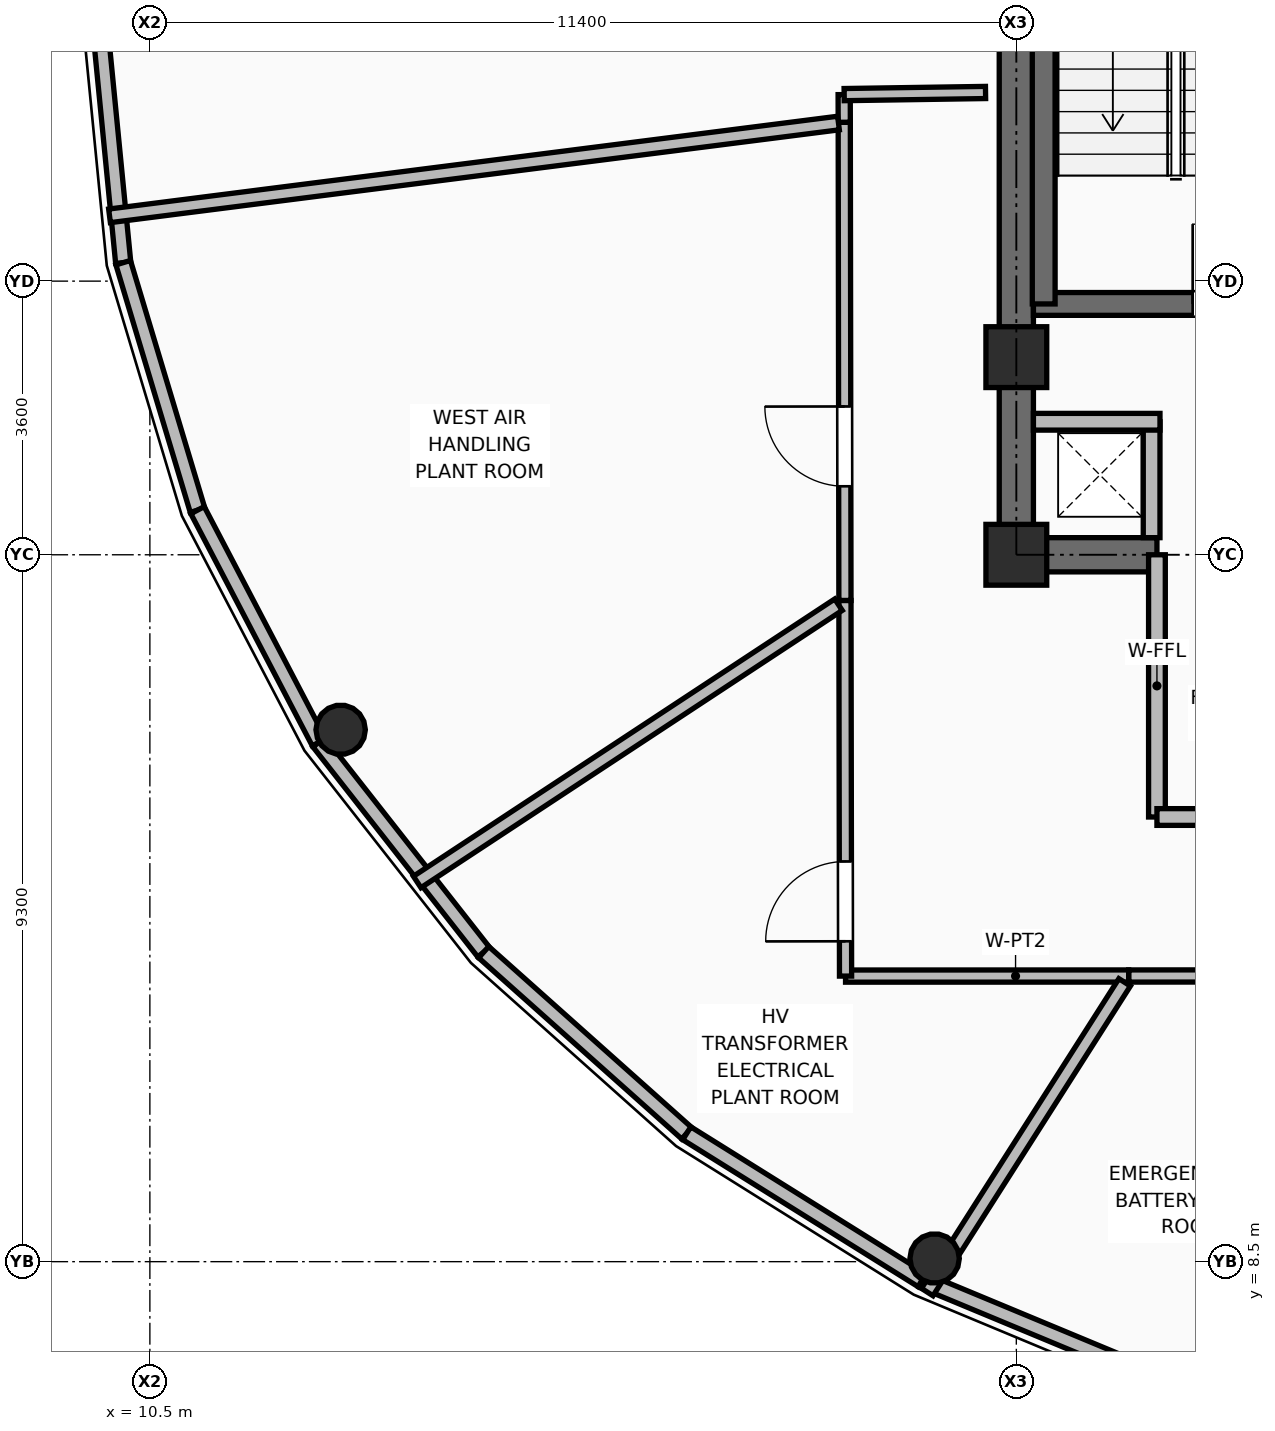
"""IFC4 building model, lengths in metres.
Left out: names, types, materials, properties, quantities, classifications, styles, units other than length and angle.
Written with IfcOpenShell. Run it as: python <this file> out.ifc"""

import sys

from ifc_helpers import new_model, si_unit, direction, frame, frame_2d, origin, origin_2d, place, context, subcontext, project, spatial, rectangle, hollow_circle, extrude, element, fill, save


model = new_model("IFC4")
c1 = context("Model", 3, precision=1e-05, world=origin(), true_north=direction((0.0, 1.0)))
c2 = subcontext(c1, "Body", "Model", "MODEL_VIEW")
j1 = project(units=[si_unit("LENGTHUNIT", "METRE"), si_unit("PLANEANGLEUNIT", "RADIAN")], contexts=[c1])
p1 = place(None, origin())
s1 = spatial("IfcSite", under=j1, at=p1, CompositionType="ELEMENT")
p2 = place(p1, origin())
s2 = spatial("IfcBuilding", under=s1, at=p2, CompositionType="ELEMENT")
p3 = place(p2, frame((0.0, 0.0, 253.65)))
s3 = spatial("IfcBuildingStorey", under=s2, at=p3, CompositionType="ELEMENT", Elevation=253.65)
for number, where, z_axis, x_axis in (
    (1, (21.9, 17.8, 0.0), (0.0, 0.0, 1.0), (1.0, 0.0, 0.0)),
    (2, (21.9, 20.4, 0.0), (0.0, 0.0, 1.0), (1.0, 0.0, 0.0)),
):
    element("IfcColumn", number, at=place(p3, frame(where, z_axis=z_axis, x_axis=x_axis)), inside=s3, PredefinedType="COLUMN", context=c2, shape_type="SweptSolid", body=[
        extrude(rectangle(XDim=0.8, YDim=0.8, at=origin_2d()), origin(), (0.0, 0.0, 1.0), 5.4),
    ])
p4 = place(p3, frame((13.01, 15.498, 0.0), z_axis=(0.224793032222, 0.115835378923, 0.967496903175), x_axis=(-0.458059425605, 0.888921572814, 0.0)))
e3 = element("IfcColumn", 3, at=p4, inside=s3, PredefinedType="COLUMN", context=c2, shape_type="SweptSolid", body=[
    extrude(hollow_circle(Radius=0.325, WallThickness=0.03, at=origin_2d()), origin(), (0.0, 0.0, 1.0), 5.396),
])
p5 = place(p3, frame((20.825, 8.542, 0.0), z_axis=(0.130171994019, 0.201410172818, 0.970818826691), x_axis=(-0.839859571413, 0.542803740136, 0.0)))
e4 = element("IfcColumn", 4, at=p5, inside=s3, PredefinedType="COLUMN", context=c2, shape_type="SweptSolid", body=[
    extrude(hollow_circle(Radius=0.325, WallThickness=0.03, at=origin_2d()), origin(), (0.0, 0.0, 1.0), 5.377),
])
p6 = place(p3, frame((9.82, 25.0, 0.0), z_axis=(0.0, 0.0, 1.0), x_axis=(0.097496920609, -0.995235826562, 0.0)))
e5 = element("IfcWall", 5, at=p6, inside=s3, PredefinedType="PARAPET", context=c2, shape_type="SweptSolid", body=[
    extrude(rectangle(XDim=3.373, YDim=0.2, at=frame_2d((1.687, 0.0))), origin(), (0.0, 0.0, 1.0), 1.12),
])
p7 = place(p3, frame((10.149, 21.643, 0.0), z_axis=(0.0, 0.0, 1.0), x_axis=(0.287670684646, -0.957729386202, 0.0)))
e6 = element("IfcWall", 6, at=p7, inside=s3, PredefinedType="PARAPET", context=c2, shape_type="SweptSolid", body=[
    extrude(rectangle(XDim=3.4, YDim=0.2, at=frame_2d((1.7, 0.0))), origin(), (0.0, 0.0, 1.0), 1.12),
])
p8 = place(p3, frame((11.127, 18.387, 0.0), z_axis=(0.0, 0.0, 1.0), x_axis=(0.463654949237, -0.886015850901, 0.0)))
e7 = element("IfcWall", 7, at=p8, inside=s3, PredefinedType="PARAPET", context=c2, shape_type="SweptSolid", body=[
    extrude(rectangle(XDim=3.447, YDim=0.2, at=frame_2d((1.723, 0.0))), origin(), (0.0, 0.0, 1.0), 1.12),
])
p9 = place(p3, frame((12.725, 15.333, 0.0), z_axis=(0.0, 0.0, 1.0), x_axis=(0.617406744437, -0.786644082113, 0.0)))
e8 = element("IfcWall", 8, at=p9, inside=s3, PredefinedType="PARAPET", context=c2, shape_type="SweptSolid", body=[
    extrude(rectangle(XDim=3.51, YDim=0.2, at=frame_2d((1.755, 0.0))), origin(), (0.0, 0.0, 1.0), 1.12),
])
p10 = place(p3, frame((14.892, 12.572, 0.0), z_axis=(0.0, 0.0, 1.0), x_axis=(0.74629085689, -0.665619979359, 0.0)))
e9 = element("IfcWall", 9, at=p10, inside=s3, PredefinedType="PARAPET", context=c2, shape_type="SweptSolid", body=[
    extrude(rectangle(XDim=3.58, YDim=0.2, at=frame_2d((1.79, 0.0))), origin(), (0.0, 0.0, 1.0), 1.12),
])
p11 = place(p3, frame((17.564, 10.189, 0.0), z_axis=(0.0, 0.0, 1.0), x_axis=(0.84825750298, -0.529583995828, 0.0)))
e10 = element("IfcWall", 10, at=p11, inside=s3, PredefinedType="PARAPET", context=c2, shape_type="SweptSolid", body=[
    extrude(rectangle(XDim=3.65, YDim=0.2, at=frame_2d((1.825, 0.0))), origin(), (0.0, 0.0, 1.0), 1.12),
])
p12 = place(p3, frame((20.66, 8.256, 0.0), z_axis=(0.0, 0.0, 1.0), x_axis=(0.92336680677, -0.383918923935, 0.0)))
e11 = element("IfcWall", 11, at=p12, inside=s3, PredefinedType="PARAPET", context=c2, shape_type="SweptSolid", body=[
    extrude(rectangle(XDim=3.709, YDim=0.2, at=frame_2d((1.854, 0.0))), origin(), (0.0, 0.0, 1.0), 1.12),
])
p13 = place(p3, frame((21.675, 17.8, 0.0), z_axis=(0.0, 0.0, 1.0), x_axis=(1.0, 0.0, 0.0)))
e12 = element("IfcWall", 12, at=p13, inside=s3, PredefinedType="SHEAR", context=c2, shape_type="SweptSolid", body=[
    extrude(rectangle(XDim=2.075, YDim=0.45, at=frame_2d((1.038, 0.0))), origin(), (0.0, 0.0, 1.0), 5.22),
])
p14 = place(p3, frame((21.9, 18.025, 0.0), z_axis=(0.0, 0.0, 1.0), x_axis=(0.0, 1.0, 0.0)))
e13 = element("IfcWall", 13, at=p14, inside=s3, PredefinedType="SHEAR", context=c2, shape_type="SweptSolid", body=[
    extrude(rectangle(XDim=14.2, YDim=0.45, at=frame_2d((7.1, 0.0))), origin(), (0.0, 0.0, 1.0), 5.22),
])
p15 = place(p3, frame((22.125, 21.1, 0.0), z_axis=(0.0, 0.0, 1.0), x_axis=(1.0, 0.0, 0.0)))
e14 = element("IfcWall", 14, at=p15, inside=s3, PredefinedType="SHEAR", context=c2, shape_type="SweptSolid", body=[
    extrude(rectangle(XDim=3.615, YDim=0.3, at=frame_2d((1.808, 0.0))), origin(), (0.0, 0.0, 1.0), 5.22),
])
p16 = place(p15, frame((2.095, 0.0, 0.0)))
e15 = element("IfcOpeningElement", 15, at=p16, cuts=e14, PredefinedType="OPENING", context=c2, shape_type="SweptSolid", body=[
    extrude(rectangle(XDim=1.05, YDim=2.1, at=frame_2d((0.525, 1.05))), frame((0.0, 0.16, 0.0), z_axis=(0.0, -1.0, 0.0), x_axis=(1.0, 0.0, 0.0)), (0.0, 0.0, 1.0), 0.32),
])
p17 = place(p3, frame((22.26, 21.1, 0.0), z_axis=(0.0, 0.0, 1.0), x_axis=(0.0, 1.0, 0.0)))
e16 = element("IfcWall", 16, at=p17, inside=s3, PredefinedType="SHEAR", context=c2, shape_type="SweptSolid", body=[
    extrude(rectangle(XDim=7.75, YDim=0.3, at=frame_2d((3.875, 0.0))), origin(), (0.0, 0.0, 1.0), 5.22),
])
p18 = place(p3, frame((23.68, 18.025, 0.0), z_axis=(0.0, 0.0, 1.0), x_axis=(0.0, 1.0, 0.0)))
e17 = element("IfcWall", 17, at=p18, inside=s3, PredefinedType="PARTITIONING", context=c2, shape_type="SweptSolid", body=[
    extrude(rectangle(XDim=1.525, YDim=0.22, at=frame_2d((0.763, 0.0))), origin(), (0.0, 0.0, 1.0), 5.2),
])
p19 = place(p3, frame((22.125, 19.55, 0.0), z_axis=(0.0, 0.0, 1.0), x_axis=(1.0, 0.0, 0.0)))
e18 = element("IfcWall", 18, at=p19, inside=s3, PredefinedType="PARTITIONING", context=c2, shape_type="SweptSolid", body=[
    extrude(rectangle(XDim=1.665, YDim=0.22, at=frame_2d((0.833, 0.0))), origin(), (0.0, 0.0, 1.0), 4.245),
])
p20 = place(p3, frame((23.75, 14.35, 0.0), z_axis=(0.0, 0.0, 1.0), x_axis=(0.0, 1.0, 0.0)))
e19 = element("IfcWall", 19, at=p20, inside=s3, PredefinedType="PARTITIONING", context=c2, shape_type="SweptSolid", body=[
    extrude(rectangle(XDim=3.45, YDim=0.22, at=frame_2d((1.725, 0.0))), origin(), (0.0, 0.0, 1.0), 4.733),
])
p21 = place(p3, frame((23.75, 14.35, 0.0), z_axis=(0.0, 0.0, 1.0), x_axis=(1.0, 0.0, 0.0)))
e20 = element("IfcWall", 20, at=p21, inside=s3, PredefinedType="PARTITIONING", context=c2, shape_type="SweptSolid", body=[
    extrude(rectangle(XDim=3.8, YDim=0.22, at=frame_2d((1.9, 0.0))), origin(), (0.0, 0.0, 1.0), 5.2),
])
p22 = place(p3, frame((28.511, 12.261, 0.0), z_axis=(0.0, 0.0, 1.0), x_axis=(-0.999999837123, -0.000570749015, 0.0)))
e21 = element("IfcWall", 21, at=p22, inside=s3, PredefinedType="PARTITIONING", context=c2, shape_type="SweptSolid", body=[
    extrude(rectangle(XDim=5.133, YDim=0.16, at=frame_2d((2.566, 0.0))), origin(), (0.0, 0.0, 1.0), 5.2),
])
p23 = place(p22, frame((2.042, 0.0, 0.0)))
e22 = element("IfcOpeningElement", 22, at=p23, cuts=e21, PredefinedType="OPENING", context=c2, shape_type="SweptSolid", body=[
    extrude(rectangle(XDim=1.05, YDim=2.1, at=frame_2d((0.525, 1.05))), frame((0.0, 0.09, 0.0), z_axis=(0.0, -1.0, 0.0), x_axis=(1.0, 0.0, 0.0)), (0.0, 0.0, 1.0), 0.18),
])
p24 = place(p3, frame((23.378, 12.258, 0.0), z_axis=(0.0, 0.0, 1.0), x_axis=(-0.999999965632, -0.00026217473, 0.0)))
e23 = element("IfcWall", 23, at=p24, inside=s3, PredefinedType="PARTITIONING", context=c2, shape_type="SweptSolid", body=[
    extrude(rectangle(XDim=3.725, YDim=0.16, at=frame_2d((1.862, 0.0))), origin(), (0.0, 0.0, 1.0), 4.733),
])
p25 = place(p3, frame((19.653, 12.257, 0.0), z_axis=(0.0, 0.0, 1.0), x_axis=(-0.001630271522, 0.999998671106, 0.0)))
e24 = element("IfcWall", 24, at=p25, inside=s3, PredefinedType="PARTITIONING", context=c2, shape_type="SweptSolid", body=[
    extrude(rectangle(XDim=4.942, YDim=0.16, at=frame_2d((2.471, 0.0))), origin(), (0.0, 0.0, 1.0), 4.733),
])
p26 = place(p25, frame((0.458, 0.0, 0.0)))
e25 = element("IfcOpeningElement", 25, at=p26, cuts=e24, PredefinedType="OPENING", context=c2, shape_type="SweptSolid", body=[
    extrude(rectangle(XDim=1.05, YDim=2.1, at=frame_2d((0.525, 1.05))), frame((0.0, 0.09, 0.0), z_axis=(0.0, -1.0, 0.0), x_axis=(1.0, 0.0, 0.0)), (0.0, 0.0, 1.0), 0.18),
])
p27 = place(p3, frame((19.645, 17.199, 0.0), z_axis=(0.0, 0.0, 1.0), x_axis=(-0.001435887995, 0.999998969112, 0.0)))
e26 = element("IfcWall", 26, at=p27, inside=s3, PredefinedType="PARTITIONING", context=c2, shape_type="SweptSolid", body=[
    extrude(rectangle(XDim=6.291, YDim=0.16, at=frame_2d((3.146, 0.0))), origin(), (0.0, 0.0, 1.0), 4.733),
])
p28 = place(p27, frame((1.502, 0.0, 0.0)))
e27 = element("IfcOpeningElement", 27, at=p28, cuts=e26, PredefinedType="OPENING", context=c2, shape_type="SweptSolid", body=[
    extrude(rectangle(XDim=1.05, YDim=2.1, at=frame_2d((0.525, 1.05))), frame((0.0, 0.09, 0.0), z_axis=(0.0, -1.0, 0.0), x_axis=(1.0, 0.0, 0.0)), (0.0, 0.0, 1.0), 0.18),
])
p29 = place(p3, frame((19.636, 23.49, 0.0), z_axis=(0.0, 0.0, 1.0), x_axis=(-0.002682753592, 0.99999640141, 0.0)))
e28 = element("IfcWall", 28, at=p29, inside=s3, PredefinedType="PARTITIONING", context=c2, shape_type="SweptSolid", body=[
    extrude(rectangle(XDim=0.364, YDim=0.16, at=frame_2d((0.182, 0.0))), origin(), (0.0, 0.0, 1.0), 5.2),
])
p30 = place(p3, frame((19.635, 23.854, 0.0), z_axis=(0.0, 0.0, 1.0), x_axis=(0.999886107392, 0.015092125259, 0.0)))
e29 = element("IfcWall", 29, at=p30, inside=s3, PredefinedType="PARTITIONING", context=c2, shape_type="SweptSolid", body=[
    extrude(rectangle(XDim=1.86, YDim=0.16, at=frame_2d((0.93, 0.0))), origin(), (0.0, 0.0, 1.0), 4.245),
])
p31 = place(p3, frame((19.56, 23.48, 0.0), z_axis=(0.0, 0.0, 1.0), x_axis=(-0.991994461283, -0.12628138732, 0.0)))
e30 = element("IfcWall", 30, at=p31, inside=s3, PredefinedType="PARTITIONING", context=c2, shape_type="SweptSolid", body=[
    extrude(rectangle(XDim=9.668, YDim=0.18, at=frame_2d((4.834, 0.0))), origin(), (0.0, 0.0, 1.0), 4.575),
])
p32 = place(p3, frame((19.56, 17.143, 0.0), z_axis=(0.0, 0.0, 1.0), x_axis=(-0.835329937022, -0.549748939349, 0.0)))
e31 = element("IfcWall", 31, at=p32, inside=s3, PredefinedType="PARTITIONING", context=c2, shape_type="SweptSolid", body=[
    extrude(rectangle(XDim=6.636, YDim=0.18, at=frame_2d((3.318, 0.0))), origin(), (0.0, 0.0, 1.0), 4.575),
])
p33 = place(p3, frame((23.325, 12.175, 0.0), z_axis=(0.0, 0.0, 1.0), x_axis=(-0.537431147311, -0.843307631829, 0.0)))
e32 = element("IfcWall", 32, at=p33, inside=s3, PredefinedType="PARTITIONING", context=c2, shape_type="SweptSolid", body=[
    extrude(rectangle(XDim=4.832, YDim=0.18, at=frame_2d((2.416, 0.0))), origin(), (0.0, 0.0, 1.0), 4.575),
])
p34 = place(p16, origin())
e33 = element("IfcDoor", 33, at=p34, inside=s3, OperationType="SINGLE_SWING_LEFT", PredefinedType="DOOR", context=c2, shape_type="SweptSolid", body=[
    extrude(rectangle(XDim=1.05, YDim=2.1, at=frame_2d((0.525, 1.05))), frame((0.0, 0.025, 0.0), z_axis=(0.0, -1.0, 0.0), x_axis=(1.0, 0.0, 0.0)), (0.0, 0.0, 1.0), 0.05),
])
fill(e15, e33)
p35 = place(p28, origin())
e34 = element("IfcDoor", 34, at=p35, inside=s3, OperationType="SINGLE_SWING_RIGHT", PredefinedType="DOOR", context=c2, shape_type="SweptSolid", body=[
    extrude(rectangle(XDim=1.05, YDim=2.1, at=frame_2d((0.525, 1.05))), frame((0.0, 0.025, 0.0), z_axis=(0.0, -1.0, 0.0), x_axis=(1.0, 0.0, 0.0)), (0.0, 0.0, 1.0), 0.05),
])
fill(e27, e34)
p36 = place(p26, origin())
e35 = element("IfcDoor", 35, at=p36, inside=s3, OperationType="SINGLE_SWING_LEFT", PredefinedType="DOOR", context=c2, shape_type="SweptSolid", body=[
    extrude(rectangle(XDim=1.05, YDim=2.1, at=frame_2d((0.525, 1.05))), frame((0.0, 0.025, 0.0), z_axis=(0.0, -1.0, 0.0), x_axis=(1.0, 0.0, 0.0)), (0.0, 0.0, 1.0), 0.05),
])
fill(e25, e35)
save(model, sys.argv[1])
